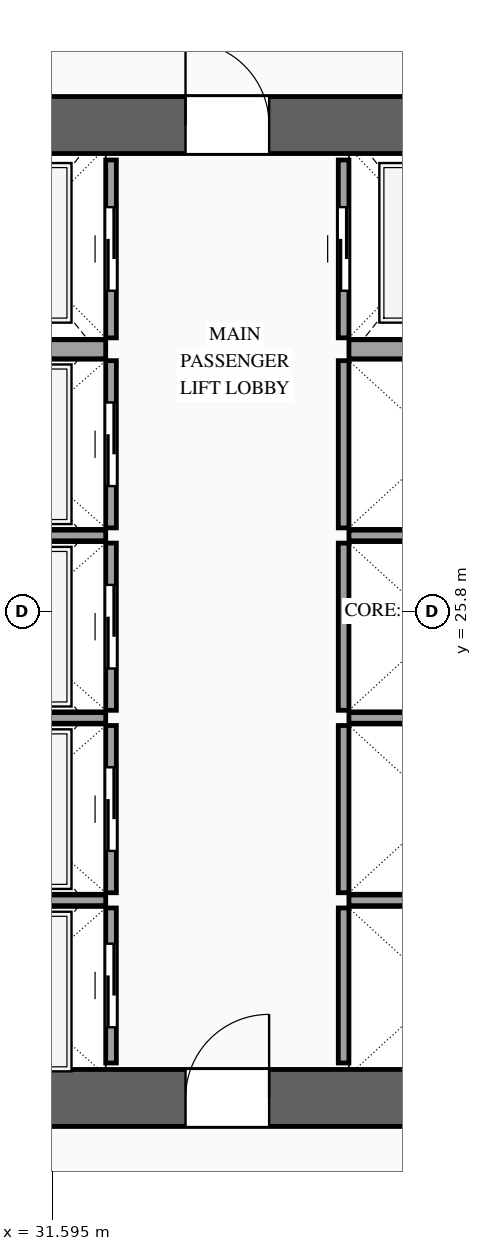
"""IFC4 building model, lengths in metres.
Left out: names, types, materials, properties, quantities, classifications, styles, units other than length and angle.
Written with IfcOpenShell. Run it as: python <this file> out.ifc"""

import sys

from ifc_helpers import new_model, si_unit, direction, frame, frame_2d, origin, place, context, subcontext, project, spatial, rectangle, extrude, source, transform, mapped, element, fill, save


model = new_model("IFC4")
c1 = context("Model", 3, precision=1e-05, world=origin(), true_north=direction((0.0, 1.0)))
c2 = subcontext(c1, "Body", "Model", "MODEL_VIEW")
j1 = project(units=[si_unit("LENGTHUNIT", "METRE"), si_unit("PLANEANGLEUNIT", "RADIAN")], contexts=[c1])
p1 = place(None, origin())
s1 = spatial("IfcSite", under=j1, at=p1, CompositionType="ELEMENT")
p2 = place(p1, origin())
s2 = spatial("IfcBuilding", under=s1, at=p2, CompositionType="ELEMENT")
p3 = place(p2, frame((0.0, 0.0, 119.0)))
s3 = spatial("IfcBuildingStorey", under=s2, at=p3, CompositionType="ELEMENT", Elevation=119.0)
p4 = place(p3, frame((23.425, 19.4, 0.0), z_axis=(0.0, 0.0, 1.0), x_axis=(1.0, 0.0, 0.0)))
e1 = element("IfcWall", 1, at=p4, inside=s3, PredefinedType="SHEAR", context=c2, shape_type="SweptSolid", body=[
    extrude(rectangle(XDim=27.15, YDim=0.75, at=frame_2d((13.575, 0.0))), origin(), (0.0, 0.0, 1.0), 3.6),
])
p5 = place(p4, frame((2.025, 0.0, 0.0)))
e2 = element("IfcOpeningElement", 2, at=p5, cuts=e1, PredefinedType="OPENING", context=c2, shape_type="SweptSolid", body=[
    extrude(rectangle(XDim=1.1, YDim=2.2, at=frame_2d((0.55, 1.1))), frame((0.0, 0.39, 0.0), z_axis=(0.0, -1.0, 0.0), x_axis=(1.0, 0.0, 0.0)), (0.0, 0.0, 1.0), 0.78),
])
p6 = place(p4, frame((9.925, 0.0, 0.0)))
e3 = element("IfcOpeningElement", 3, at=p6, cuts=e1, PredefinedType="OPENING", context=c2, shape_type="SweptSolid", body=[
    extrude(rectangle(XDim=1.1, YDim=2.2, at=frame_2d((0.55, 1.1))), frame((0.0, 0.39, 0.0), z_axis=(0.0, -1.0, 0.0), x_axis=(1.0, 0.0, 0.0)), (0.0, 0.0, 1.0), 0.78),
])
p7 = place(p4, frame((23.125, 0.0, 0.0)))
e4 = element("IfcOpeningElement", 4, at=p7, cuts=e1, PredefinedType="OPENING", context=c2, shape_type="SweptSolid", body=[
    extrude(rectangle(XDim=1.1, YDim=2.2, at=frame_2d((0.55, 1.1))), frame((0.0, 0.39, 0.0), z_axis=(0.0, -1.0, 0.0), x_axis=(1.0, 0.0, 0.0)), (0.0, 0.0, 1.0), 0.78),
])
p8 = place(p4, frame((19.745, 0.0, 0.0)))
e5 = element("IfcOpeningElement", 5, at=p8, cuts=e1, PredefinedType="OPENING", context=c2, shape_type="SweptSolid", body=[
    extrude(rectangle(XDim=0.9, YDim=2.15, at=frame_2d((0.45, 1.075))), frame((0.0, 0.39, 0.0), z_axis=(0.0, -1.0, 0.0), x_axis=(1.0, 0.0, 0.0)), (0.0, 0.0, 1.0), 0.78),
])
p9 = place(p4, frame((18.305, 0.0, 0.0)))
e6 = element("IfcOpeningElement", 6, at=p9, cuts=e1, PredefinedType="OPENING", context=c2, shape_type="SweptSolid", body=[
    extrude(rectangle(XDim=0.9, YDim=2.15, at=frame_2d((0.45, 1.075))), frame((0.0, 0.39, 0.0), z_axis=(0.0, -1.0, 0.0), x_axis=(1.0, 0.0, 0.0)), (0.0, 0.0, 1.0), 0.78),
])
p10 = place(p3, frame((23.425, 32.2, 0.0), z_axis=(0.0, 0.0, 1.0), x_axis=(1.0, 0.0, 0.0)))
e7 = element("IfcWall", 7, at=p10, inside=s3, PredefinedType="SHEAR", context=c2, shape_type="SweptSolid", body=[
    extrude(rectangle(XDim=27.15, YDim=0.75, at=frame_2d((13.575, 0.0))), origin(), (0.0, 0.0, 1.0), 3.6),
])
p11 = place(p10, frame((4.645, 0.0, 0.0)))
e8 = element("IfcOpeningElement", 8, at=p11, cuts=e7, PredefinedType="OPENING", context=c2, shape_type="SweptSolid", body=[
    extrude(rectangle(XDim=0.9, YDim=2.15, at=frame_2d((0.45, 1.075))), frame((0.0, 0.39, 0.0), z_axis=(0.0, -1.0, 0.0), x_axis=(1.0, 0.0, 0.0)), (0.0, 0.0, 1.0), 0.78),
])
p12 = place(p10, frame((9.925, 0.0, 0.0)))
e9 = element("IfcOpeningElement", 9, at=p12, cuts=e7, PredefinedType="OPENING", context=c2, shape_type="SweptSolid", body=[
    extrude(rectangle(XDim=1.1, YDim=2.2, at=frame_2d((0.55, 1.1))), frame((0.0, 0.39, 0.0), z_axis=(0.0, -1.0, 0.0), x_axis=(1.0, 0.0, 0.0)), (0.0, 0.0, 1.0), 0.78),
])
p13 = place(p10, frame((15.775, 0.0, 0.0)))
e10 = element("IfcOpeningElement", 10, at=p13, cuts=e7, PredefinedType="OPENING", context=c2, shape_type="SweptSolid", body=[
    extrude(rectangle(XDim=1.1, YDim=2.2, at=frame_2d((0.55, 1.1))), frame((0.0, 0.39, 0.0), z_axis=(0.0, -1.0, 0.0), x_axis=(1.0, 0.0, 0.0)), (0.0, 0.0, 1.0), 0.78),
])
p14 = place(p10, frame((18.305, 0.0, 0.0)))
e11 = element("IfcOpeningElement", 11, at=p14, cuts=e7, PredefinedType="OPENING", context=c2, shape_type="SweptSolid", body=[
    extrude(rectangle(XDim=0.9, YDim=2.15, at=frame_2d((0.45, 1.075))), frame((0.0, 0.39, 0.0), z_axis=(0.0, -1.0, 0.0), x_axis=(1.0, 0.0, 0.0)), (0.0, 0.0, 1.0), 0.78),
])
p15 = place(p10, frame((19.745, 0.0, 0.0)))
e12 = element("IfcOpeningElement", 12, at=p15, cuts=e7, PredefinedType="OPENING", context=c2, shape_type="SweptSolid", body=[
    extrude(rectangle(XDim=0.9, YDim=2.15, at=frame_2d((0.45, 1.075))), frame((0.0, 0.39, 0.0), z_axis=(0.0, -1.0, 0.0), x_axis=(1.0, 0.0, 0.0)), (0.0, 0.0, 1.0), 0.78),
])
p16 = place(p3, frame((32.37, 19.86, 0.0), z_axis=(0.0, 0.0, 1.0), x_axis=(0.0, 1.0, 0.0)))
e13 = element("IfcWall", 13, at=p16, inside=s3, PredefinedType="SOLIDWALL", context=c2, shape_type="SweptSolid", body=[
    extrude(rectangle(XDim=2.04, YDim=0.14, at=frame_2d((1.02, 0.0))), origin(), (0.0, 0.0, 1.0), 3.38),
])
p17 = place(p16, frame((0.47, 0.0, 0.0)))
e14 = element("IfcOpeningElement", 14, at=p17, cuts=e13, PredefinedType="OPENING", context=c2, shape_type="SweptSolid", body=[
    extrude(rectangle(XDim=1.1, YDim=2.2, at=frame_2d((0.55, 1.1))), frame((0.0, 0.085, 0.0), z_axis=(0.0, -1.0, 0.0), x_axis=(1.0, 0.0, 0.0)), (0.0, 0.0, 1.0), 0.17),
])
m1 = source(origin(), c2, "Body", "SweptSolid", [
    extrude(rectangle(XDim=2.5, YDim=0.14, at=frame_2d((1.25, 0.0))), origin(), (0.0, 0.0, 1.0), 3.38),
])
p18 = place(p3, frame((29.8, 22.0, 0.0), z_axis=(0.0, 0.0, 1.0), x_axis=(1.0, 0.0, 0.0)))
e15 = element("IfcWall", 15, at=p18, inside=s3, PredefinedType="SOLIDWALL", context=c2, shape_type="MappedRepresentation", body=[
    mapped(m1, transform((0.0, 0.0, 0.0), scale=1.0)),
])
p19 = place(p3, frame((32.37, 22.1, 0.0), z_axis=(0.0, 0.0, 1.0), x_axis=(0.0, 1.0, 0.0)))
e16 = element("IfcWall", 16, at=p19, inside=s3, PredefinedType="SOLIDWALL", context=c2, shape_type="SweptSolid", body=[
    extrude(rectangle(XDim=2.2, YDim=0.14, at=frame_2d((1.1, 0.0))), origin(), (0.0, 0.0, 1.0), 3.38),
])
p20 = place(p19, frame((0.55, 0.0, 0.0)))
e17 = element("IfcOpeningElement", 17, at=p20, cuts=e16, PredefinedType="OPENING", context=c2, shape_type="SweptSolid", body=[
    extrude(rectangle(XDim=1.1, YDim=2.2, at=frame_2d((0.55, 1.1))), frame((0.0, 0.085, 0.0), z_axis=(0.0, -1.0, 0.0), x_axis=(1.0, 0.0, 0.0)), (0.0, 0.0, 1.0), 0.17),
])
p21 = place(p3, frame((29.8, 24.4, 0.0), z_axis=(0.0, 0.0, 1.0), x_axis=(1.0, 0.0, 0.0)))
e18 = element("IfcWall", 18, at=p21, inside=s3, PredefinedType="SOLIDWALL", context=c2, shape_type="MappedRepresentation", body=[
    mapped(m1, transform((0.0, 0.0, 0.0), scale=1.0)),
])
p22 = place(p3, frame((32.37, 24.5, 0.0), z_axis=(0.0, 0.0, 1.0), x_axis=(0.0, 1.0, 0.0)))
e19 = element("IfcWall", 19, at=p22, inside=s3, PredefinedType="SOLIDWALL", context=c2, shape_type="SweptSolid", body=[
    extrude(rectangle(XDim=2.2, YDim=0.14, at=frame_2d((1.1, 0.0))), origin(), (0.0, 0.0, 1.0), 3.38),
])
p23 = place(p22, frame((0.55, 0.0, 0.0)))
e20 = element("IfcOpeningElement", 20, at=p23, cuts=e19, PredefinedType="OPENING", context=c2, shape_type="SweptSolid", body=[
    extrude(rectangle(XDim=1.1, YDim=2.2, at=frame_2d((0.55, 1.1))), frame((0.0, 0.085, 0.0), z_axis=(0.0, -1.0, 0.0), x_axis=(1.0, 0.0, 0.0)), (0.0, 0.0, 1.0), 0.17),
])
p24 = place(p3, frame((29.8, 26.8, 0.0), z_axis=(0.0, 0.0, 1.0), x_axis=(1.0, 0.0, 0.0)))
e21 = element("IfcWall", 21, at=p24, inside=s3, PredefinedType="SOLIDWALL", context=c2, shape_type="MappedRepresentation", body=[
    mapped(m1, transform((0.0, 0.0, 0.0), scale=1.0)),
])
p25 = place(p3, frame((32.37, 26.9, 0.0), z_axis=(0.0, 0.0, 1.0), x_axis=(0.0, 1.0, 0.0)))
e22 = element("IfcWall", 22, at=p25, inside=s3, PredefinedType="SOLIDWALL", context=c2, shape_type="SweptSolid", body=[
    extrude(rectangle(XDim=2.2, YDim=0.14, at=frame_2d((1.1, 0.0))), origin(), (0.0, 0.0, 1.0), 3.38),
])
p26 = place(p25, frame((0.55, 0.0, 0.0)))
e23 = element("IfcOpeningElement", 23, at=p26, cuts=e22, PredefinedType="OPENING", context=c2, shape_type="SweptSolid", body=[
    extrude(rectangle(XDim=1.1, YDim=2.2, at=frame_2d((0.55, 1.1))), frame((0.0, 0.085, 0.0), z_axis=(0.0, -1.0, 0.0), x_axis=(1.0, 0.0, 0.0)), (0.0, 0.0, 1.0), 0.17),
])
p27 = place(p3, frame((32.37, 29.4, 0.0), z_axis=(0.0, 0.0, 1.0), x_axis=(0.0, 1.0, 0.0)))
e24 = element("IfcWall", 24, at=p27, inside=s3, PredefinedType="SOLIDWALL", context=c2, shape_type="SweptSolid", body=[
    extrude(rectangle(XDim=2.34, YDim=0.14, at=frame_2d((1.17, 0.0))), origin(), (0.0, 0.0, 1.0), 3.38),
])
p28 = place(p27, frame((0.62, 0.0, 0.0)))
e25 = element("IfcOpeningElement", 25, at=p28, cuts=e24, PredefinedType="OPENING", context=c2, shape_type="SweptSolid", body=[
    extrude(rectangle(XDim=1.1, YDim=2.2, at=frame_2d((0.55, 1.1))), frame((0.0, 0.085, 0.0), z_axis=(0.0, -1.0, 0.0), x_axis=(1.0, 0.0, 0.0)), (0.0, 0.0, 1.0), 0.17),
])
m2 = source(origin(), c2, "Body", "SweptSolid", [
    extrude(rectangle(XDim=2.5, YDim=0.25, at=frame_2d((1.25, 0.0))), origin(), (0.0, 0.0, 1.0), 3.38),
])
p29 = place(p3, frame((29.8, 29.25, 0.0), z_axis=(0.0, 0.0, 1.0), x_axis=(1.0, 0.0, 0.0)))
e26 = element("IfcWall", 26, at=p29, inside=s3, PredefinedType="SOLIDWALL", context=c2, shape_type="MappedRepresentation", body=[
    mapped(m2, transform((0.0, 0.0, 0.0), scale=1.0)),
])
m3 = source(origin(), c2, "Body", "SweptSolid", [
    extrude(rectangle(XDim=2.04, YDim=0.14, at=frame_2d((1.02, 0.0))), origin(), (0.0, 0.0, 1.0), 3.38),
])
p30 = place(p3, frame((35.43, 19.86, 0.0), z_axis=(0.0, 0.0, 1.0), x_axis=(0.0, 1.0, 0.0)))
e27 = element("IfcWall", 27, at=p30, inside=s3, PredefinedType="SOLIDWALL", context=c2, shape_type="MappedRepresentation", body=[
    mapped(m3, transform((0.0, 0.0, 0.0), scale=1.0)),
])
m4 = source(origin(), c2, "Body", "SweptSolid", [
    extrude(rectangle(XDim=2.4, YDim=0.14, at=frame_2d((1.2, 0.0))), origin(), (0.0, 0.0, 1.0), 3.38),
])
p31 = place(p3, frame((35.5, 22.0, 0.0), z_axis=(0.0, 0.0, 1.0), x_axis=(1.0, 0.0, 0.0)))
e28 = element("IfcWall", 28, at=p31, inside=s3, PredefinedType="SOLIDWALL", context=c2, shape_type="MappedRepresentation", body=[
    mapped(m4, transform((0.0, 0.0, 0.0), scale=1.0)),
])
m5 = source(origin(), c2, "Body", "SweptSolid", [
    extrude(rectangle(XDim=2.2, YDim=0.14, at=frame_2d((1.1, 0.0))), origin(), (0.0, 0.0, 1.0), 3.38),
])
p32 = place(p3, frame((35.43, 22.1, 0.0), z_axis=(0.0, 0.0, 1.0), x_axis=(0.0, 1.0, 0.0)))
e29 = element("IfcWall", 29, at=p32, inside=s3, PredefinedType="SOLIDWALL", context=c2, shape_type="MappedRepresentation", body=[
    mapped(m5, transform((0.0, 0.0, 0.0), scale=1.0)),
])
p33 = place(p3, frame((35.5, 24.4, 0.0), z_axis=(0.0, 0.0, 1.0), x_axis=(1.0, 0.0, 0.0)))
e30 = element("IfcWall", 30, at=p33, inside=s3, PredefinedType="SOLIDWALL", context=c2, shape_type="MappedRepresentation", body=[
    mapped(m4, transform((0.0, 0.0, 0.0), scale=1.0)),
])
p34 = place(p3, frame((35.43, 24.5, 0.0), z_axis=(0.0, 0.0, 1.0), x_axis=(0.0, 1.0, 0.0)))
e31 = element("IfcWall", 31, at=p34, inside=s3, PredefinedType="SOLIDWALL", context=c2, shape_type="MappedRepresentation", body=[
    mapped(m5, transform((0.0, 0.0, 0.0), scale=1.0)),
])
p35 = place(p3, frame((35.5, 26.8, 0.0), z_axis=(0.0, 0.0, 1.0), x_axis=(1.0, 0.0, 0.0)))
e32 = element("IfcWall", 32, at=p35, inside=s3, PredefinedType="SOLIDWALL", context=c2, shape_type="MappedRepresentation", body=[
    mapped(m4, transform((0.0, 0.0, 0.0), scale=1.0)),
])
m6 = source(origin(), c2, "Body", "SweptSolid", [
    extrude(rectangle(XDim=2.2, YDim=0.14, at=frame_2d((1.1, 0.0))), origin(), (0.0, 0.0, 1.0), 3.38),
])
p36 = place(p3, frame((35.43, 26.9, 0.0), z_axis=(0.0, 0.0, 1.0), x_axis=(0.0, 1.0, 0.0)))
e33 = element("IfcWall", 33, at=p36, inside=s3, PredefinedType="SOLIDWALL", context=c2, shape_type="MappedRepresentation", body=[
    mapped(m6, transform((0.0, 0.0, 0.0), scale=1.0)),
])
p37 = place(p3, frame((35.43, 29.4, 0.0), z_axis=(0.0, 0.0, 1.0), x_axis=(0.0, 1.0, 0.0)))
e34 = element("IfcWall", 34, at=p37, inside=s3, PredefinedType="SOLIDWALL", context=c2, shape_type="SweptSolid", body=[
    extrude(rectangle(XDim=2.34, YDim=0.14, at=frame_2d((1.17, 0.0))), origin(), (0.0, 0.0, 1.0), 3.38),
])
p38 = place(p37, frame((0.62, 0.0, 0.0)))
e35 = element("IfcOpeningElement", 35, at=p38, cuts=e34, PredefinedType="OPENING", context=c2, shape_type="SweptSolid", body=[
    extrude(rectangle(XDim=1.1, YDim=2.2, at=frame_2d((0.55, 1.1))), frame((0.0, 0.085, 0.0), z_axis=(0.0, -1.0, 0.0), x_axis=(1.0, 0.0, 0.0)), (0.0, 0.0, 1.0), 0.17),
])
m7 = source(origin(), c2, "Body", "SweptSolid", [
    extrude(rectangle(XDim=2.4, YDim=0.25, at=frame_2d((1.2, 0.0))), origin(), (0.0, 0.0, 1.0), 3.38),
])
p39 = place(p3, frame((35.5, 29.25, 0.0), z_axis=(0.0, 0.0, 1.0), x_axis=(1.0, 0.0, 0.0)))
e36 = element("IfcWall", 36, at=p39, inside=s3, PredefinedType="SOLIDWALL", context=c2, shape_type="MappedRepresentation", body=[
    mapped(m7, transform((0.0, 0.0, 0.0), scale=1.0)),
])
m8 = source(origin(), c2, "Body", "SweptSolid", [
    extrude(rectangle(XDim=1.1, YDim=2.2, at=frame_2d((0.55, 1.1))), frame((0.0, 0.025, 0.0), z_axis=(0.0, -1.0, 0.0), x_axis=(1.0, 0.0, 0.0)), (0.0, 0.0, 1.0), 0.05),
])
p40 = place(p17, origin())
e37 = element("IfcDoor", 37, at=p40, inside=s3, OperationType="SLIDING_TO_LEFT", PredefinedType="DOOR", context=c2, shape_type="MappedRepresentation", body=[
    mapped(m8, transform((0.0, 0.0, 0.0), scale=1.0)),
])
fill(e14, e37)
p41 = place(p20, origin())
e38 = element("IfcDoor", 38, at=p41, inside=s3, OperationType="SLIDING_TO_RIGHT", PredefinedType="DOOR", context=c2, shape_type="MappedRepresentation", body=[
    mapped(m8, transform((0.0, 0.0, 0.0), scale=1.0)),
])
fill(e17, e38)
p42 = place(p23, origin())
e39 = element("IfcDoor", 39, at=p42, inside=s3, OperationType="SLIDING_TO_LEFT", PredefinedType="DOOR", context=c2, shape_type="MappedRepresentation", body=[
    mapped(m8, transform((0.0, 0.0, 0.0), scale=1.0)),
])
fill(e20, e39)
p43 = place(p26, origin())
e40 = element("IfcDoor", 40, at=p43, inside=s3, OperationType="SLIDING_TO_RIGHT", PredefinedType="DOOR", context=c2, shape_type="MappedRepresentation", body=[
    mapped(m8, transform((0.0, 0.0, 0.0), scale=1.0)),
])
fill(e23, e40)
p44 = place(p28, origin())
e41 = element("IfcDoor", 41, at=p44, inside=s3, OperationType="SLIDING_TO_LEFT", PredefinedType="DOOR", context=c2, shape_type="MappedRepresentation", body=[
    mapped(m8, transform((0.0, 0.0, 0.0), scale=1.0)),
])
fill(e25, e41)
p45 = place(p38, origin())
e42 = element("IfcDoor", 42, at=p45, inside=s3, OperationType="SLIDING_TO_RIGHT", PredefinedType="DOOR", context=c2, shape_type="MappedRepresentation", body=[
    mapped(m8, transform((0.0, 0.0, 0.0), scale=1.0)),
])
fill(e35, e42)
m9 = source(origin(), c2, "Body", "SweptSolid", [
    extrude(rectangle(XDim=1.1, YDim=2.2, at=frame_2d((0.55, 1.1))), frame((0.0, 0.025, 0.0), z_axis=(0.0, -1.0, 0.0), x_axis=(1.0, 0.0, 0.0)), (0.0, 0.0, 1.0), 0.05),
])
p46 = place(p6, origin())
e43 = element("IfcDoor", 43, at=p46, inside=s3, OperationType="SINGLE_SWING_RIGHT", PredefinedType="DOOR", context=c2, shape_type="MappedRepresentation", body=[
    mapped(m9, transform((0.0, 0.0, 0.0), scale=1.0)),
])
fill(e3, e43)
p47 = place(p12, origin())
e44 = element("IfcDoor", 44, at=p47, inside=s3, OperationType="SINGLE_SWING_LEFT", PredefinedType="DOOR", context=c2, shape_type="MappedRepresentation", body=[
    mapped(m9, transform((0.0, 0.0, 0.0), scale=1.0)),
])
fill(e9, e44)
save(model, sys.argv[1])
